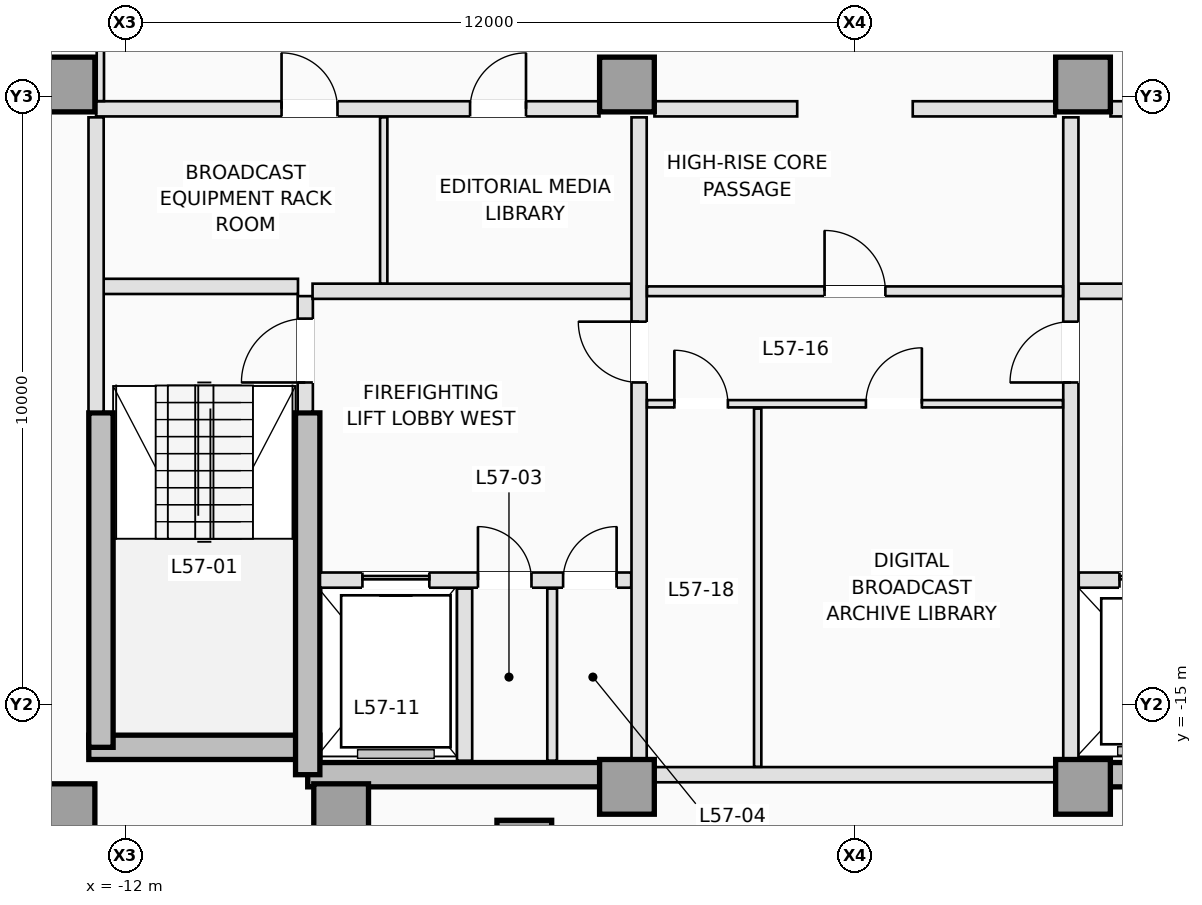
"""IFC4 building model, lengths in metres.
Left out: names, types, materials, properties, quantities, classifications, styles, units other than length and angle.
Written with IfcOpenShell. Run it as: python <this file> out.ifc"""

import sys

from ifc_helpers import new_model, si_unit, direction, frame, frame_2d, origin, origin_2d, place, context, subcontext, project, spatial, rectangle, extrude, element, fill, save


model = new_model("IFC4")
c1 = context("Model", 3, precision=1e-05, world=origin(), true_north=direction((0.0, 1.0)))
c2 = subcontext(c1, "Body", "Model", "MODEL_VIEW")
j1 = project(units=[si_unit("LENGTHUNIT", "METRE"), si_unit("PLANEANGLEUNIT", "RADIAN")], contexts=[c1])
p1 = place(None, origin())
s1 = spatial("IfcSite", under=j1, at=p1, CompositionType="ELEMENT")
p2 = place(p1, origin())
s2 = spatial("IfcBuilding", under=s1, at=p2, CompositionType="ELEMENT")
p3 = place(p2, frame((0.0, 0.0, 207.9)))
s3 = spatial("IfcBuildingStorey", under=s2, at=p3, CompositionType="ELEMENT", Elevation=207.9)
p4 = place(p3, frame((-12.6, -15.7, 0.0), z_axis=(0.0, 0.0, 1.0), x_axis=(1.0, 0.0, 0.0)))
e1 = element("IfcWall", 1, at=p4, inside=s3, PredefinedType="SHEAR", context=c2, shape_type="SweptSolid", body=[
    extrude(rectangle(XDim=3.8, YDim=0.4, at=frame_2d((1.9, 0.0))), origin(), (0.0, 0.0, 1.0), 3.5),
])
for number, where, z_axis, x_axis in (
    (2, (-9.0, -16.15, 0.0), (0.0, 0.0, 1.0), (1.0, 0.0, 0.0)),
    (3, (3.75, -16.15, 0.0), (0.0, 0.0, 1.0), (1.0, 0.0, 0.0)),
):
    element("IfcWall", number, at=place(p3, frame(where, z_axis=z_axis, x_axis=x_axis)), inside=s3, PredefinedType="SHEAR", context=c2, shape_type="SweptSolid", body=[
        extrude(rectangle(XDim=5.25, YDim=0.4, at=frame_2d((2.625, 0.0))), origin(), (0.0, 0.0, 1.0), 3.5),
    ])
p5 = place(p3, frame((-12.4, -15.7, 0.0), z_axis=(0.0, 0.0, 1.0), x_axis=(0.0, 1.0, 0.0)))
e4 = element("IfcWall", 4, at=p5, inside=s3, PredefinedType="SHEAR", context=c2, shape_type="SweptSolid", body=[
    extrude(rectangle(XDim=5.5, YDim=0.4, at=frame_2d((2.75, 0.0))), origin(), (0.0, 0.0, 1.0), 3.5),
])
p6 = place(p3, frame((-9.0, -16.15, 0.0), z_axis=(0.0, 0.0, 1.0), x_axis=(0.0, 1.0, 0.0)))
e5 = element("IfcWall", 5, at=p6, inside=s3, PredefinedType="SHEAR", context=c2, shape_type="SweptSolid", body=[
    extrude(rectangle(XDim=5.95, YDim=0.4, at=frame_2d((2.975, 0.0))), origin(), (0.0, 0.0, 1.0), 3.5),
])
for number, where, z_axis, x_axis in (
    (6, (-12.95, -16.75, 0.0), (0.0, 0.0, 1.0), (1.0, 0.0, 0.0)),
    (7, (-8.45, -16.75, 0.0), (0.0, 0.0, 1.0), (1.0, 0.0, 0.0)),
    (8, (-3.75, -16.35, 0.0), (0.0, 0.0, 1.0), (1.0, 0.0, 0.0)),
    (9, (3.75, -16.35, 0.0), (0.0, 0.0, 1.0), (1.0, 0.0, 0.0)),
    (10, (-12.95, -4.8, 0.0), (0.0, 0.0, 1.0), (1.0, 0.0, 0.0)),
    (11, (-3.75, -4.8, 0.0), (0.0, 0.0, 1.0), (1.0, 0.0, 0.0)),
    (12, (3.75, -4.8, 0.0), (0.0, 0.0, 1.0), (1.0, 0.0, 0.0)),
    (13, (-5.438, -17.35, 0.0), (0.0, 0.0, 1.0), (0.0, 1.0, 0.0)),
):
    element("IfcColumn", number, at=place(p3, frame(where, z_axis=z_axis, x_axis=x_axis)), inside=s3, PredefinedType="COLUMN", context=c2, shape_type="SweptSolid", body=[
        extrude(rectangle(XDim=0.9, YDim=0.9, at=origin_2d()), origin(), (0.0, 0.0, 1.0), 3.5),
    ])
p7 = place(p3, frame((-9.04, -10.18, 0.0), z_axis=(0.0, 0.0, 1.0), x_axis=(0.0, 1.0, 0.0)))
e14 = element("IfcWall", 14, at=p7, inside=s3, PredefinedType="PARTITIONING", context=c2, shape_type="SweptSolid", body=[
    extrude(rectangle(XDim=1.9, YDim=0.25, at=frame_2d((0.95, 0.0))), origin(), (0.0, 0.0, 1.0), 3.25),
])
p8 = place(p7, frame((0.48, 0.0, 0.0)))
e15 = element("IfcOpeningElement", 15, at=p8, cuts=e14, PredefinedType="OPENING", context=c2, shape_type="SweptSolid", body=[
    extrude(rectangle(XDim=1.05, YDim=2.15, at=frame_2d((0.525, 1.075))), frame((0.0, 0.135, 0.0), z_axis=(0.0, -1.0, 0.0), x_axis=(1.0, 0.0, 0.0)), (0.0, 0.0, 1.0), 0.27),
])
p9 = place(p3, frame((-12.38, -8.12, 0.0), z_axis=(0.0, 0.0, 1.0), x_axis=(1.0, 0.0, 0.0)))
e16 = element("IfcWall", 16, at=p9, inside=s3, PredefinedType="PARTITIONING", context=c2, shape_type="SweptSolid", body=[
    extrude(rectangle(XDim=3.22, YDim=0.25, at=frame_2d((1.61, 0.0))), origin(), (0.0, 0.0, 1.0), 3.25),
])
p10 = place(p3, frame((-12.48, -10.18, 0.0), z_axis=(0.0, 0.0, 1.0), x_axis=(0.0, 1.0, 0.0)))
e17 = element("IfcWall", 17, at=p10, inside=s3, PredefinedType="PARTITIONING", context=c2, shape_type="SweptSolid", body=[
    extrude(rectangle(XDim=4.84, YDim=0.25, at=frame_2d((2.42, 0.0))), origin(), (0.0, 0.0, 1.0), 3.25),
])
p11 = place(p3, frame((-8.798, -12.95, 0.0), z_axis=(0.0, 0.0, 1.0), x_axis=(1.0, 0.0, 0.0)))
e18 = element("IfcWall", 18, at=p11, inside=s3, PredefinedType="PARTITIONING", context=c2, shape_type="SweptSolid", body=[
    extrude(rectangle(XDim=5.118, YDim=0.25, at=frame_2d((2.559, 0.0))), origin(), (0.0, 0.0, 1.0), 3.25),
])
p12 = place(p11, frame((0.698, 0.0, 0.0)))
e19 = element("IfcOpeningElement", 19, at=p12, cuts=e18, PredefinedType="OPENING", context=c2, shape_type="SweptSolid", body=[
    extrude(rectangle(XDim=1.1, YDim=2.15, at=frame_2d((0.55, 1.075))), frame((0.0, 0.135, 0.0), z_axis=(0.0, -1.0, 0.0), x_axis=(1.0, 0.0, 0.0)), (0.0, 0.0, 1.0), 0.27),
])
p13 = place(p11, frame((2.598, 0.0, 0.0)))
e20 = element("IfcOpeningElement", 20, at=p13, cuts=e18, PredefinedType="OPENING", context=c2, shape_type="SweptSolid", body=[
    extrude(rectangle(XDim=0.88, YDim=2.1, at=frame_2d((0.44, 1.05))), frame((0.0, 0.135, 0.0), z_axis=(0.0, -1.0, 0.0), x_axis=(1.0, 0.0, 0.0)), (0.0, 0.0, 1.0), 0.27),
])
p14 = place(p11, frame((3.998, 0.0, 0.0)))
e21 = element("IfcOpeningElement", 21, at=p14, cuts=e18, PredefinedType="OPENING", context=c2, shape_type="SweptSolid", body=[
    extrude(rectangle(XDim=0.88, YDim=2.1, at=frame_2d((0.44, 1.05))), frame((0.0, 0.135, 0.0), z_axis=(0.0, -1.0, 0.0), x_axis=(1.0, 0.0, 0.0)), (0.0, 0.0, 1.0), 0.27),
])
p15 = place(p3, frame((3.68, -12.95, 0.0), z_axis=(0.0, 0.0, 1.0), x_axis=(1.0, 0.0, 0.0)))
e22 = element("IfcWall", 22, at=p15, inside=s3, PredefinedType="PARTITIONING", context=c2, shape_type="SweptSolid", body=[
    extrude(rectangle(XDim=5.118, YDim=0.25, at=frame_2d((2.559, 0.0))), origin(), (0.0, 0.0, 1.0), 3.25),
])
p16 = place(p15, frame((3.32, 0.0, 0.0)))
e23 = element("IfcOpeningElement", 23, at=p16, cuts=e22, PredefinedType="OPENING", context=c2, shape_type="SweptSolid", body=[
    extrude(rectangle(XDim=1.1, YDim=2.15, at=frame_2d((0.55, 1.075))), frame((0.0, 0.135, 0.0), z_axis=(0.0, -1.0, 0.0), x_axis=(1.0, 0.0, 0.0)), (0.0, 0.0, 1.0), 0.27),
])
p17 = place(p15, frame((0.67, 0.0, 0.0)))
e24 = element("IfcOpeningElement", 24, at=p17, cuts=e22, PredefinedType="OPENING", context=c2, shape_type="SweptSolid", body=[
    extrude(rectangle(XDim=1.2, YDim=2.15, at=frame_2d((0.6, 1.075))), frame((0.0, 0.135, 0.0), z_axis=(0.0, -1.0, 0.0), x_axis=(1.0, 0.0, 0.0)), (0.0, 0.0, 1.0), 0.27),
])
p18 = place(p3, frame((-6.42, -15.92, 0.0), z_axis=(0.0, 0.0, 1.0), x_axis=(0.0, 1.0, 0.0)))
e25 = element("IfcWall", 25, at=p18, inside=s3, PredefinedType="PARTITIONING", context=c2, shape_type="SweptSolid", body=[
    extrude(rectangle(XDim=2.83, YDim=0.25, at=frame_2d((1.415, 0.0))), origin(), (0.0, 0.0, 1.0), 3.25),
])
p19 = place(p3, frame((-4.98, -15.92, 0.0), z_axis=(0.0, 0.0, 1.0), x_axis=(0.0, 1.0, 0.0)))
e26 = element("IfcWall", 26, at=p19, inside=s3, PredefinedType="PARTITIONING", context=c2, shape_type="SweptSolid", body=[
    extrude(rectangle(XDim=2.83, YDim=0.16, at=frame_2d((1.415, 0.0))), origin(), (0.0, 0.0, 1.0), 3.25),
])
for number, where, z_axis, x_axis in (
    (27, (-8.92, -8.2, 0.0), (0.0, 0.0, 1.0), (1.0, 0.0, 0.0)),
    (28, (3.68, -8.2, 0.0), (0.0, 0.0, 1.0), (1.0, 0.0, 0.0)),
):
    element("IfcWall", number, at=place(p3, frame(where, z_axis=z_axis, x_axis=x_axis)), inside=s3, PredefinedType="PARTITIONING", context=c2, shape_type="SweptSolid", body=[
        extrude(rectangle(XDim=5.24, YDim=0.25, at=frame_2d((2.62, 0.0))), origin(), (0.0, 0.0, 1.0), 3.25),
    ])
p20 = place(p3, frame((-3.55, -15.898, 0.0), z_axis=(0.0, 0.0, 1.0), x_axis=(0.0, 1.0, 0.0)))
e29 = element("IfcWall", 29, at=p20, inside=s3, PredefinedType="PARTITIONING", context=c2, shape_type="SweptSolid", body=[
    extrude(rectangle(XDim=10.558, YDim=0.25, at=frame_2d((5.279, 0.0))), origin(), (0.0, 0.0, 1.0), 3.25),
])
p21 = place(p20, frame((6.198, 0.0, 0.0)))
e30 = element("IfcOpeningElement", 30, at=p21, cuts=e29, PredefinedType="OPENING", context=c2, shape_type="SweptSolid", body=[
    extrude(rectangle(XDim=1.0, YDim=2.15, at=frame_2d((0.5, 1.075))), frame((0.0, 0.135, 0.0), z_axis=(0.0, -1.0, 0.0), x_axis=(1.0, 0.0, 0.0)), (0.0, 0.0, 1.0), 0.27),
])
p22 = place(p3, frame((3.55, -15.898, 0.0), z_axis=(0.0, 0.0, 1.0), x_axis=(0.0, 1.0, 0.0)))
e31 = element("IfcWall", 31, at=p22, inside=s3, PredefinedType="PARTITIONING", context=c2, shape_type="SweptSolid", body=[
    extrude(rectangle(XDim=10.558, YDim=0.25, at=frame_2d((5.279, 0.0))), origin(), (0.0, 0.0, 1.0), 3.25),
])
p23 = place(p22, frame((6.198, 0.0, 0.0)))
e32 = element("IfcOpeningElement", 32, at=p23, cuts=e31, PredefinedType="OPENING", context=c2, shape_type="SweptSolid", body=[
    extrude(rectangle(XDim=1.0, YDim=2.15, at=frame_2d((0.5, 1.075))), frame((0.0, 0.135, 0.0), z_axis=(0.0, -1.0, 0.0), x_axis=(1.0, 0.0, 0.0)), (0.0, 0.0, 1.0), 0.27),
])
p24 = place(p3, frame((-12.48, -5.2, 0.0), z_axis=(0.0, 0.0, 1.0), x_axis=(1.0, 0.0, 0.0)))
e33 = element("IfcWall", 33, at=p24, inside=s3, PredefinedType="PARTITIONING", context=c2, shape_type="SweptSolid", body=[
    extrude(rectangle(XDim=8.278, YDim=0.25, at=frame_2d((4.139, 0.0))), origin(), (0.0, 0.0, 1.0), 3.25),
])
p25 = place(p24, frame((3.05, 0.0, 0.0)))
e34 = element("IfcOpeningElement", 34, at=p25, cuts=e33, PredefinedType="OPENING", context=c2, shape_type="SweptSolid", body=[
    extrude(rectangle(XDim=0.92, YDim=2.12, at=frame_2d((0.46, 1.06))), frame((0.0, 0.135, 0.0), z_axis=(0.0, -1.0, 0.0), x_axis=(1.0, 0.0, 0.0)), (0.0, 0.0, 1.0), 0.27),
])
p26 = place(p24, frame((6.15, 0.0, 0.0)))
e35 = element("IfcOpeningElement", 35, at=p26, cuts=e33, PredefinedType="OPENING", context=c2, shape_type="SweptSolid", body=[
    extrude(rectangle(XDim=0.92, YDim=2.12, at=frame_2d((0.46, 1.06))), frame((0.0, 0.135, 0.0), z_axis=(0.0, -1.0, 0.0), x_axis=(1.0, 0.0, 0.0)), (0.0, 0.0, 1.0), 0.27),
])
p27 = place(p3, frame((4.202, -5.2, 0.0), z_axis=(0.0, 0.0, 1.0), x_axis=(1.0, 0.0, 0.0)))
e36 = element("IfcWall", 36, at=p27, inside=s3, PredefinedType="PARTITIONING", context=c2, shape_type="SweptSolid", body=[
    extrude(rectangle(XDim=8.278, YDim=0.25, at=frame_2d((4.139, 0.0))), origin(), (0.0, 0.0, 1.0), 3.25),
])
p28 = place(p27, frame((0.748, 0.0, 0.0)))
e37 = element("IfcOpeningElement", 37, at=p28, cuts=e36, PredefinedType="OPENING", context=c2, shape_type="SweptSolid", body=[
    extrude(rectangle(XDim=1.0, YDim=2.15, at=frame_2d((0.5, 1.075))), frame((0.0, 0.135, 0.0), z_axis=(0.0, -1.0, 0.0), x_axis=(1.0, 0.0, 0.0)), (0.0, 0.0, 1.0), 0.27),
])
p29 = place(p27, frame((2.698, 0.0, 0.0)))
e38 = element("IfcOpeningElement", 38, at=p29, cuts=e36, PredefinedType="OPENING", context=c2, shape_type="SweptSolid", body=[
    extrude(rectangle(XDim=1.0, YDim=2.15, at=frame_2d((0.5, 1.075))), frame((0.0, 0.135, 0.0), z_axis=(0.0, -1.0, 0.0), x_axis=(1.0, 0.0, 0.0)), (0.0, 0.0, 1.0), 0.27),
])
p30 = place(p27, frame((4.648, 0.0, 0.0)))
e39 = element("IfcOpeningElement", 39, at=p30, cuts=e36, PredefinedType="OPENING", context=c2, shape_type="SweptSolid", body=[
    extrude(rectangle(XDim=1.0, YDim=2.15, at=frame_2d((0.5, 1.075))), frame((0.0, 0.135, 0.0), z_axis=(0.0, -1.0, 0.0), x_axis=(1.0, 0.0, 0.0)), (0.0, 0.0, 1.0), 0.27),
])
p31 = place(p27, frame((6.598, 0.0, 0.0)))
e40 = element("IfcOpeningElement", 40, at=p31, cuts=e36, PredefinedType="OPENING", context=c2, shape_type="SweptSolid", body=[
    extrude(rectangle(XDim=1.0, YDim=2.15, at=frame_2d((0.5, 1.075))), frame((0.0, 0.135, 0.0), z_axis=(0.0, -1.0, 0.0), x_axis=(1.0, 0.0, 0.0)), (0.0, 0.0, 1.0), 0.27),
])
for number, where, z_axis, x_axis in (
    (41, (-3.298, -5.2, 0.0), (0.0, 0.0, 1.0), (1.0, 0.0, 0.0)),
    (42, (0.95, -5.2, 0.0), (0.0, 0.0, 1.0), (1.0, 0.0, 0.0)),
):
    element("IfcWall", number, at=place(p3, frame(where, z_axis=z_axis, x_axis=x_axis)), inside=s3, PredefinedType="PARTITIONING", context=c2, shape_type="SweptSolid", body=[
        extrude(rectangle(XDim=2.348, YDim=0.25, at=frame_2d((1.174, 0.0))), origin(), (0.0, 0.0, 1.0), 3.25),
    ])
p32 = place(p3, frame((-7.75, -8.073, 0.0), z_axis=(0.0, 0.0, 1.0), x_axis=(0.0, 1.0, 0.0)))
e43 = element("IfcWall", 43, at=p32, inside=s3, PredefinedType="PARTITIONING", context=c2, shape_type="SweptSolid", body=[
    extrude(rectangle(XDim=2.733, YDim=0.12, at=frame_2d((1.366, 0.0))), origin(), (0.0, 0.0, 1.0), 3.25),
])
p33 = place(p3, frame((-3.298, -16.15, 0.0), z_axis=(0.0, 0.0, 1.0), x_axis=(1.0, 0.0, 0.0)))
e44 = element("IfcWall", 44, at=p33, inside=s3, PredefinedType="PARTITIONING", context=c2, shape_type="SweptSolid", body=[
    extrude(rectangle(XDim=6.596, YDim=0.25, at=frame_2d((3.298, 0.0))), origin(), (0.0, 0.0, 1.0), 2.45),
])
p34 = place(p3, frame((-3.42, -8.2, 0.0), z_axis=(0.0, 0.0, 1.0), x_axis=(1.0, 0.0, 0.0)))
e45 = element("IfcWall", 45, at=p34, inside=s3, PredefinedType="PARTITIONING", context=c2, shape_type="SweptSolid", body=[
    extrude(rectangle(XDim=6.84, YDim=0.16, at=frame_2d((3.42, 0.0))), origin(), (0.0, 0.0, 1.0), 3.25),
])
p35 = place(p34, frame((2.92, 0.0, 0.0)))
e46 = element("IfcOpeningElement", 46, at=p35, cuts=e45, PredefinedType="OPENING", context=c2, shape_type="SweptSolid", body=[
    extrude(rectangle(XDim=1.0, YDim=2.15, at=frame_2d((0.5, 1.075))), frame((0.0, 0.09, 0.0), z_axis=(0.0, -1.0, 0.0), x_axis=(1.0, 0.0, 0.0)), (0.0, 0.0, 1.0), 0.18),
])
p36 = place(p3, frame((-3.42, -10.05, 0.0), z_axis=(0.0, 0.0, 1.0), x_axis=(1.0, 0.0, 0.0)))
e47 = element("IfcWall", 47, at=p36, inside=s3, PredefinedType="PARTITIONING", context=c2, shape_type="SweptSolid", body=[
    extrude(rectangle(XDim=6.84, YDim=0.12, at=frame_2d((3.42, 0.0))), origin(), (0.0, 0.0, 1.0), 3.25),
])
p37 = place(p36, frame((0.45, 0.0, 0.0)))
e48 = element("IfcOpeningElement", 48, at=p37, cuts=e47, PredefinedType="OPENING", context=c2, shape_type="SweptSolid", body=[
    extrude(rectangle(XDim=0.88, YDim=2.12, at=frame_2d((0.44, 1.06))), frame((0.0, 0.07, 0.0), z_axis=(0.0, -1.0, 0.0), x_axis=(1.0, 0.0, 0.0)), (0.0, 0.0, 1.0), 0.14),
])
p38 = place(p36, frame((3.6, 0.0, 0.0)))
e49 = element("IfcOpeningElement", 49, at=p38, cuts=e47, PredefinedType="OPENING", context=c2, shape_type="SweptSolid", body=[
    extrude(rectangle(XDim=0.92, YDim=2.12, at=frame_2d((0.46, 1.06))), frame((0.0, 0.07, 0.0), z_axis=(0.0, -1.0, 0.0), x_axis=(1.0, 0.0, 0.0)), (0.0, 0.0, 1.0), 0.14),
])
p39 = place(p3, frame((-1.6, -16.02, 0.0), z_axis=(0.0, 0.0, 1.0), x_axis=(0.0, 1.0, 0.0)))
e50 = element("IfcWall", 50, at=p39, inside=s3, PredefinedType="PARTITIONING", context=c2, shape_type="SweptSolid", body=[
    extrude(rectangle(XDim=5.89, YDim=0.12, at=frame_2d((2.945, 0.0))), origin(), (0.0, 0.0, 1.0), 3.25),
])
p40 = place(p3, frame((-12.41, -5.073, 0.0), z_axis=(0.0, 0.0, 1.0), x_axis=(0.0, 1.0, 0.0)))
e51 = element("IfcWall", 51, at=p40, inside=s3, PredefinedType="PARTITIONING", context=c2, shape_type="SweptSolid", body=[
    extrude(rectangle(XDim=2.673, YDim=0.12, at=frame_2d((1.336, 0.0))), origin(), (0.0, 0.0, 1.0), 3.25),
])
p41 = place(p12, origin())
e52 = element("IfcDoor", 52, at=p41, inside=s3, OperationType="SLIDING_TO_LEFT", PredefinedType="DOOR", context=c2, shape_type="SweptSolid", body=[
    extrude(rectangle(XDim=1.1, YDim=2.15, at=frame_2d((0.55, 1.075))), frame((0.0, 0.025, 0.0), z_axis=(0.0, -1.0, 0.0), x_axis=(1.0, 0.0, 0.0)), (0.0, 0.0, 1.0), 0.05),
])
fill(e19, e52)
p42 = place(p17, origin())
e53 = element("IfcDoor", 53, at=p42, inside=s3, OperationType="SLIDING_TO_LEFT", PredefinedType="DOOR", context=c2, shape_type="SweptSolid", body=[
    extrude(rectangle(XDim=1.2, YDim=2.15, at=frame_2d((0.6, 1.075))), frame((0.0, 0.025, 0.0), z_axis=(0.0, -1.0, 0.0), x_axis=(1.0, 0.0, 0.0)), (0.0, 0.0, 1.0), 0.05),
])
fill(e24, e53)
p43 = place(p8, origin())
e54 = element("IfcDoor", 54, at=p43, inside=s3, OperationType="SINGLE_SWING_LEFT", PredefinedType="DOOR", context=c2, shape_type="SweptSolid", body=[
    extrude(rectangle(XDim=1.05, YDim=2.15, at=frame_2d((0.525, 1.075))), frame((0.0, 0.025, 0.0), z_axis=(0.0, -1.0, 0.0), x_axis=(1.0, 0.0, 0.0)), (0.0, 0.0, 1.0), 0.05),
])
fill(e15, e54)
p44 = place(p13, origin())
e55 = element("IfcDoor", 55, at=p44, inside=s3, OperationType="SINGLE_SWING_LEFT", PredefinedType="TRAPDOOR", context=c2, shape_type="SweptSolid", body=[
    extrude(rectangle(XDim=0.88, YDim=2.1, at=frame_2d((0.44, 1.05))), frame((0.0, 0.025, 0.0), z_axis=(0.0, -1.0, 0.0), x_axis=(1.0, 0.0, 0.0)), (0.0, 0.0, 1.0), 0.05),
])
fill(e20, e55)
p45 = place(p14, origin())
e56 = element("IfcDoor", 56, at=p45, inside=s3, OperationType="SINGLE_SWING_RIGHT", PredefinedType="TRAPDOOR", context=c2, shape_type="SweptSolid", body=[
    extrude(rectangle(XDim=0.88, YDim=2.1, at=frame_2d((0.44, 1.05))), frame((0.0, 0.025, 0.0), z_axis=(0.0, -1.0, 0.0), x_axis=(1.0, 0.0, 0.0)), (0.0, 0.0, 1.0), 0.05),
])
fill(e21, e56)
p46 = place(p21, origin())
e57 = element("IfcDoor", 57, at=p46, inside=s3, OperationType="SINGLE_SWING_RIGHT", PredefinedType="DOOR", context=c2, shape_type="SweptSolid", body=[
    extrude(rectangle(XDim=1.0, YDim=2.15, at=frame_2d((0.5, 1.075))), frame((0.0, 0.025, 0.0), z_axis=(0.0, -1.0, 0.0), x_axis=(1.0, 0.0, 0.0)), (0.0, 0.0, 1.0), 0.05),
])
fill(e30, e57)
p47 = place(p23, origin())
e58 = element("IfcDoor", 58, at=p47, inside=s3, OperationType="SINGLE_SWING_LEFT", PredefinedType="DOOR", context=c2, shape_type="SweptSolid", body=[
    extrude(rectangle(XDim=1.0, YDim=2.15, at=frame_2d((0.5, 1.075))), frame((0.0, 0.025, 0.0), z_axis=(0.0, -1.0, 0.0), x_axis=(1.0, 0.0, 0.0)), (0.0, 0.0, 1.0), 0.05),
])
fill(e32, e58)
p48 = place(p25, origin())
e59 = element("IfcDoor", 59, at=p48, inside=s3, OperationType="SINGLE_SWING_LEFT", PredefinedType="DOOR", context=c2, shape_type="SweptSolid", body=[
    extrude(rectangle(XDim=0.92, YDim=2.12, at=frame_2d((0.46, 1.06))), frame((0.0, 0.025, 0.0), z_axis=(0.0, -1.0, 0.0), x_axis=(1.0, 0.0, 0.0)), (0.0, 0.0, 1.0), 0.05),
])
fill(e34, e59)
p49 = place(p26, origin())
e60 = element("IfcDoor", 60, at=p49, inside=s3, OperationType="SINGLE_SWING_RIGHT", PredefinedType="DOOR", context=c2, shape_type="SweptSolid", body=[
    extrude(rectangle(XDim=0.92, YDim=2.12, at=frame_2d((0.46, 1.06))), frame((0.0, 0.025, 0.0), z_axis=(0.0, -1.0, 0.0), x_axis=(1.0, 0.0, 0.0)), (0.0, 0.0, 1.0), 0.05),
])
fill(e35, e60)
p50 = place(p35, origin())
e61 = element("IfcDoor", 61, at=p50, inside=s3, OperationType="SINGLE_SWING_LEFT", PredefinedType="DOOR", context=c2, shape_type="SweptSolid", body=[
    extrude(rectangle(XDim=1.0, YDim=2.15, at=frame_2d((0.5, 1.075))), frame((0.0, 0.025, 0.0), z_axis=(0.0, -1.0, 0.0), x_axis=(1.0, 0.0, 0.0)), (0.0, 0.0, 1.0), 0.05),
])
fill(e46, e61)
p51 = place(p37, origin())
e62 = element("IfcDoor", 62, at=p51, inside=s3, OperationType="SINGLE_SWING_LEFT", PredefinedType="DOOR", context=c2, shape_type="SweptSolid", body=[
    extrude(rectangle(XDim=0.88, YDim=2.12, at=frame_2d((0.44, 1.06))), frame((0.0, 0.025, 0.0), z_axis=(0.0, -1.0, 0.0), x_axis=(1.0, 0.0, 0.0)), (0.0, 0.0, 1.0), 0.05),
])
fill(e48, e62)
p52 = place(p38, origin())
e63 = element("IfcDoor", 63, at=p52, inside=s3, OperationType="SINGLE_SWING_RIGHT", PredefinedType="DOOR", context=c2, shape_type="SweptSolid", body=[
    extrude(rectangle(XDim=0.92, YDim=2.12, at=frame_2d((0.46, 1.06))), frame((0.0, 0.025, 0.0), z_axis=(0.0, -1.0, 0.0), x_axis=(1.0, 0.0, 0.0)), (0.0, 0.0, 1.0), 0.05),
])
fill(e49, e63)
save(model, sys.argv[1])
